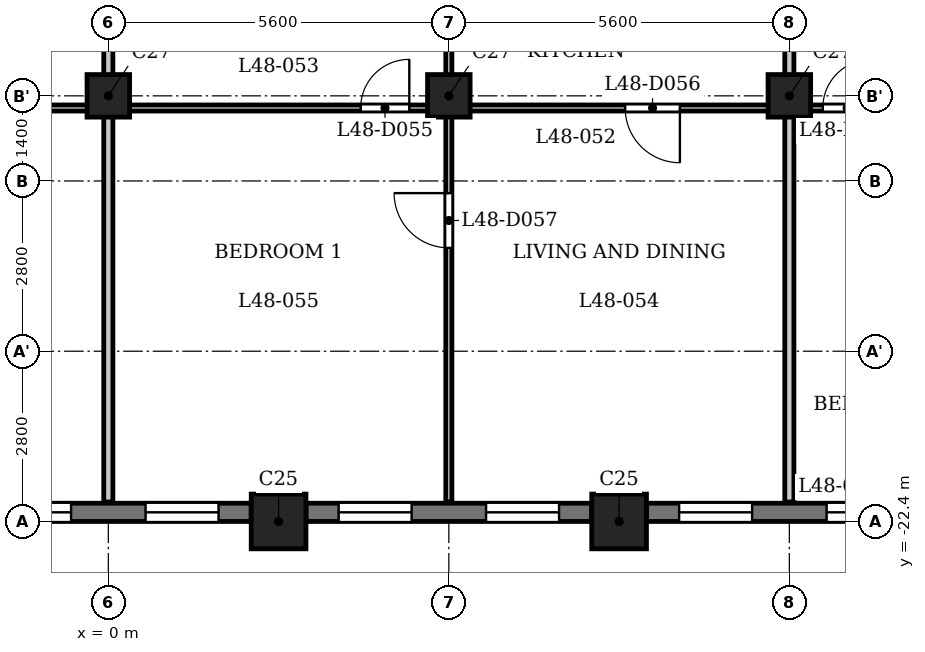
"""IFC4 building model, lengths in metres.
Left out: names, types, materials, properties, quantities, classifications, styles, units other than length and angle.
Written with IfcOpenShell. Run it as: python <this file> out.ifc"""

import sys

from ifc_helpers import new_model, si_unit, direction, frame, frame_2d, origin, origin_2d, place, context, subcontext, project, spatial, rectangle, extrude, element, fill, save


model = new_model("IFC4")
c1 = context("Model", 3, precision=1e-05, world=origin(), true_north=direction((0.0, 1.0)))
c2 = subcontext(c1, "Body", "Model", "MODEL_VIEW")
j1 = project(units=[si_unit("LENGTHUNIT", "METRE"), si_unit("PLANEANGLEUNIT", "RADIAN")], contexts=[c1])
p1 = place(None, origin())
s1 = spatial("IfcSite", under=j1, at=p1, CompositionType="ELEMENT")
p2 = place(p1, origin())
s2 = spatial("IfcBuilding", under=s1, at=p2, CompositionType="ELEMENT")
p3 = place(p2, frame((0.0, 0.0, 188.9)))
s3 = spatial("IfcBuildingStorey", under=s2, at=p3, CompositionType="ELEMENT", Elevation=188.9)
for number, where, z_axis, x_axis in (
    (1, (2.8, -22.4, 0.0), (0.0, 0.0, 1.0), (1.0, 0.0, 0.0)),
    (2, (8.4, -22.4, 0.0), (0.0, 0.0, 1.0), (1.0, 0.0, 0.0)),
):
    element("IfcColumn", number, at=place(p3, frame(where, z_axis=z_axis, x_axis=x_axis)), inside=s3, PredefinedType="COLUMN", context=c2, shape_type="SweptSolid", body=[
        extrude(rectangle(XDim=0.9, YDim=0.9, at=origin_2d()), origin(), (0.0, 0.0, 1.0), 3.5),
    ])
for number, where, z_axis, x_axis in (
    (3, (0.0, -15.4, 0.0), (0.0, 0.0, 1.0), (1.0, 0.0, 0.0)),
    (4, (5.6, -15.4, 0.0), (0.0, 0.0, 1.0), (1.0, 0.0, 0.0)),
    (5, (11.2, -15.4, 0.0), (0.0, 0.0, 1.0), (1.0, 0.0, 0.0)),
):
    element("IfcColumn", number, at=place(p3, frame(where, z_axis=z_axis, x_axis=x_axis)), inside=s3, PredefinedType="COLUMN", context=c2, shape_type="SweptSolid", body=[
        extrude(rectangle(XDim=0.7, YDim=0.7, at=origin_2d()), origin(), (0.0, 0.0, 1.0), 3.5),
    ])
p4 = place(p3, frame((-2.35, -22.25, 0.0), z_axis=(0.0, 0.0, 1.0), x_axis=(1.0, 0.0, 0.0)))
e6 = element("IfcWall", 6, at=p4, inside=s3, PredefinedType="SOLIDWALL", context=c2, shape_type="SweptSolid", body=[
    extrude(rectangle(XDim=4.7, YDim=0.3, at=frame_2d((2.35, 0.0))), origin(), (0.0, 0.0, 1.0), 2.5),
])
p5 = place(p4, frame((0.538, 0.0, 0.6)))
e7 = element("IfcOpeningElement", 7, at=p5, cuts=e6, PredefinedType="OPENING", context=c2, shape_type="SweptSolid", body=[
    extrude(rectangle(XDim=1.2, YDim=1.55, at=frame_2d((0.6, 0.775))), frame((0.0, 0.16, 0.0), z_axis=(0.0, -1.0, 0.0), x_axis=(1.0, 0.0, 0.0)), (0.0, 0.0, 1.0), 0.32),
])
p6 = place(p4, frame((2.962, 0.0, 0.6)))
e8 = element("IfcOpeningElement", 8, at=p6, cuts=e6, PredefinedType="OPENING", context=c2, shape_type="SweptSolid", body=[
    extrude(rectangle(XDim=1.2, YDim=1.55, at=frame_2d((0.6, 0.775))), frame((0.0, 0.16, 0.0), z_axis=(0.0, -1.0, 0.0), x_axis=(1.0, 0.0, 0.0)), (0.0, 0.0, 1.0), 0.32),
])
p7 = place(p3, frame((3.25, -22.25, 0.0), z_axis=(0.0, 0.0, 1.0), x_axis=(1.0, 0.0, 0.0)))
e9 = element("IfcWall", 9, at=p7, inside=s3, PredefinedType="SOLIDWALL", context=c2, shape_type="SweptSolid", body=[
    extrude(rectangle(XDim=4.7, YDim=0.3, at=frame_2d((2.35, 0.0))), origin(), (0.0, 0.0, 1.0), 2.5),
])
p8 = place(p7, frame((0.538, 0.0, 0.6)))
e10 = element("IfcOpeningElement", 10, at=p8, cuts=e9, PredefinedType="OPENING", context=c2, shape_type="SweptSolid", body=[
    extrude(rectangle(XDim=1.2, YDim=1.55, at=frame_2d((0.6, 0.775))), frame((0.0, 0.16, 0.0), z_axis=(0.0, -1.0, 0.0), x_axis=(1.0, 0.0, 0.0)), (0.0, 0.0, 1.0), 0.32),
])
p9 = place(p7, frame((2.962, 0.0, 0.6)))
e11 = element("IfcOpeningElement", 11, at=p9, cuts=e9, PredefinedType="OPENING", context=c2, shape_type="SweptSolid", body=[
    extrude(rectangle(XDim=1.2, YDim=1.55, at=frame_2d((0.6, 0.775))), frame((0.0, 0.16, 0.0), z_axis=(0.0, -1.0, 0.0), x_axis=(1.0, 0.0, 0.0)), (0.0, 0.0, 1.0), 0.32),
])
p10 = place(p3, frame((8.85, -22.25, 0.0), z_axis=(0.0, 0.0, 1.0), x_axis=(1.0, 0.0, 0.0)))
e12 = element("IfcWall", 12, at=p10, inside=s3, PredefinedType="SOLIDWALL", context=c2, shape_type="SweptSolid", body=[
    extrude(rectangle(XDim=4.7, YDim=0.3, at=frame_2d((2.35, 0.0))), origin(), (0.0, 0.0, 1.0), 2.5),
])
p11 = place(p10, frame((0.538, 0.0, 0.6)))
e13 = element("IfcOpeningElement", 13, at=p11, cuts=e12, PredefinedType="OPENING", context=c2, shape_type="SweptSolid", body=[
    extrude(rectangle(XDim=1.2, YDim=1.55, at=frame_2d((0.6, 0.775))), frame((0.0, 0.16, 0.0), z_axis=(0.0, -1.0, 0.0), x_axis=(1.0, 0.0, 0.0)), (0.0, 0.0, 1.0), 0.32),
])
p12 = place(p10, frame((2.962, 0.0, 0.6)))
e14 = element("IfcOpeningElement", 14, at=p12, cuts=e12, PredefinedType="OPENING", context=c2, shape_type="SweptSolid", body=[
    extrude(rectangle(XDim=1.2, YDim=1.55, at=frame_2d((0.6, 0.775))), frame((0.0, 0.16, 0.0), z_axis=(0.0, -1.0, 0.0), x_axis=(1.0, 0.0, 0.0)), (0.0, 0.0, 1.0), 0.32),
])
p13 = place(p3, frame((-16.725, -15.6, 0.0), z_axis=(0.0, 0.0, 1.0), x_axis=(1.0, 0.0, 0.0)))
e15 = element("IfcWall", 15, at=p13, inside=s3, PredefinedType="PARTITIONING", context=c2, shape_type="SweptSolid", body=[
    extrude(rectangle(XDim=33.45, YDim=0.1, at=frame_2d((16.725, 0.0))), origin(), (0.0, 0.0, 1.0), 3.2),
])
p14 = place(p13, frame((4.075, 0.0, 0.0)))
e16 = element("IfcOpeningElement", 16, at=p14, cuts=e15, PredefinedType="OPENING", context=c2, shape_type="SweptSolid", body=[
    extrude(rectangle(XDim=0.8, YDim=2.1, at=frame_2d((0.4, 1.05))), frame((0.0, 0.06, 0.0), z_axis=(0.0, -1.0, 0.0), x_axis=(1.0, 0.0, 0.0)), (0.0, 0.0, 1.0), 0.12),
])
p15 = place(p13, frame((1.825, 0.0, 0.0)))
e17 = element("IfcOpeningElement", 17, at=p15, cuts=e15, PredefinedType="OPENING", context=c2, shape_type="SweptSolid", body=[
    extrude(rectangle(XDim=0.9, YDim=2.1, at=frame_2d((0.45, 1.05))), frame((0.0, 0.06, 0.0), z_axis=(0.0, -1.0, 0.0), x_axis=(1.0, 0.0, 0.0)), (0.0, 0.0, 1.0), 0.12),
])
p16 = place(p13, frame((9.675, 0.0, 0.0)))
e18 = element("IfcOpeningElement", 18, at=p16, cuts=e15, PredefinedType="OPENING", context=c2, shape_type="SweptSolid", body=[
    extrude(rectangle(XDim=0.8, YDim=2.1, at=frame_2d((0.4, 1.05))), frame((0.0, 0.06, 0.0), z_axis=(0.0, -1.0, 0.0), x_axis=(1.0, 0.0, 0.0)), (0.0, 0.0, 1.0), 0.12),
])
p17 = place(p13, frame((14.025, 0.0, 0.0)))
e19 = element("IfcOpeningElement", 19, at=p17, cuts=e15, PredefinedType="OPENING", context=c2, shape_type="SweptSolid", body=[
    extrude(rectangle(XDim=0.9, YDim=2.1, at=frame_2d((0.45, 1.05))), frame((0.0, 0.06, 0.0), z_axis=(0.0, -1.0, 0.0), x_axis=(1.0, 0.0, 0.0)), (0.0, 0.0, 1.0), 0.12),
])
p18 = place(p13, frame((20.875, 0.0, 0.0)))
e20 = element("IfcOpeningElement", 20, at=p18, cuts=e15, PredefinedType="OPENING", context=c2, shape_type="SweptSolid", body=[
    extrude(rectangle(XDim=0.8, YDim=2.1, at=frame_2d((0.4, 1.05))), frame((0.0, 0.06, 0.0), z_axis=(0.0, -1.0, 0.0), x_axis=(1.0, 0.0, 0.0)), (0.0, 0.0, 1.0), 0.12),
])
p19 = place(p13, frame((25.225, 0.0, 0.0)))
e21 = element("IfcOpeningElement", 21, at=p19, cuts=e15, PredefinedType="OPENING", context=c2, shape_type="SweptSolid", body=[
    extrude(rectangle(XDim=0.9, YDim=2.1, at=frame_2d((0.45, 1.05))), frame((0.0, 0.06, 0.0), z_axis=(0.0, -1.0, 0.0), x_axis=(1.0, 0.0, 0.0)), (0.0, 0.0, 1.0), 0.12),
])
p20 = place(p13, frame((28.475, 0.0, 0.0)))
e22 = element("IfcOpeningElement", 22, at=p20, cuts=e15, PredefinedType="OPENING", context=c2, shape_type="SweptSolid", body=[
    extrude(rectangle(XDim=0.8, YDim=2.1, at=frame_2d((0.4, 1.05))), frame((0.0, 0.06, 0.0), z_axis=(0.0, -1.0, 0.0), x_axis=(1.0, 0.0, 0.0)), (0.0, 0.0, 1.0), 0.12),
])
p21 = place(p13, frame((30.675, 0.0, 0.0)))
e23 = element("IfcOpeningElement", 23, at=p21, cuts=e15, PredefinedType="OPENING", context=c2, shape_type="SweptSolid", body=[
    extrude(rectangle(XDim=0.9, YDim=2.1, at=frame_2d((0.45, 1.05))), frame((0.0, 0.06, 0.0), z_axis=(0.0, -1.0, 0.0), x_axis=(1.0, 0.0, 0.0)), (0.0, 0.0, 1.0), 0.12),
])
p22 = place(p3, frame((0.0, -22.08, 0.0), z_axis=(0.0, 0.0, 1.0), x_axis=(0.0, 1.0, 0.0)))
e24 = element("IfcWall", 24, at=p22, inside=s3, PredefinedType="PARTITIONING", context=c2, shape_type="SweptSolid", body=[
    extrude(rectangle(XDim=6.43, YDim=0.15, at=frame_2d((3.215, 0.0))), origin(), (0.0, 0.0, 1.0), 3.2),
])
p23 = place(p3, frame((0.0, -15.55, 0.0), z_axis=(0.0, 0.0, 1.0), x_axis=(0.0, 1.0, 0.0)))
e25 = element("IfcWall", 25, at=p23, inside=s3, PredefinedType="PARTITIONING", context=c2, shape_type="SweptSolid", body=[
    extrude(rectangle(XDim=2.275, YDim=0.15, at=frame_2d((1.138, 0.0))), origin(), (0.0, 0.0, 1.0), 3.2),
])
p24 = place(p3, frame((5.6, -22.08, 0.0), z_axis=(0.0, 0.0, 1.0), x_axis=(0.0, 1.0, 0.0)))
e26 = element("IfcWall", 26, at=p24, inside=s3, PredefinedType="PARTITIONING", context=c2, shape_type="SweptSolid", body=[
    extrude(rectangle(XDim=6.43, YDim=0.1, at=frame_2d((3.215, 0.0))), origin(), (0.0, 0.0, 1.0), 3.2),
])
p25 = place(p24, frame((4.18, 0.0, 0.0)))
e27 = element("IfcOpeningElement", 27, at=p25, cuts=e26, PredefinedType="OPENING", context=c2, shape_type="SweptSolid", body=[
    extrude(rectangle(XDim=0.9, YDim=2.1, at=frame_2d((0.45, 1.05))), frame((0.0, 0.06, 0.0), z_axis=(0.0, -1.0, 0.0), x_axis=(1.0, 0.0, 0.0)), (0.0, 0.0, 1.0), 0.12),
])
p26 = place(p3, frame((5.6, -15.55, 0.0), z_axis=(0.0, 0.0, 1.0), x_axis=(0.0, 1.0, 0.0)))
e28 = element("IfcWall", 28, at=p26, inside=s3, PredefinedType="PARTITIONING", context=c2, shape_type="SweptSolid", body=[
    extrude(rectangle(XDim=2.275, YDim=0.1, at=frame_2d((1.138, 0.0))), origin(), (0.0, 0.0, 1.0), 3.2),
])
p27 = place(p3, frame((11.2, -22.08, 0.0), z_axis=(0.0, 0.0, 1.0), x_axis=(0.0, 1.0, 0.0)))
e29 = element("IfcWall", 29, at=p27, inside=s3, PredefinedType="PARTITIONING", context=c2, shape_type="SweptSolid", body=[
    extrude(rectangle(XDim=6.43, YDim=0.15, at=frame_2d((3.215, 0.0))), origin(), (0.0, 0.0, 1.0), 3.2),
])
p28 = place(p3, frame((11.2, -15.55, 0.0), z_axis=(0.0, 0.0, 1.0), x_axis=(0.0, 1.0, 0.0)))
e30 = element("IfcWall", 30, at=p28, inside=s3, PredefinedType="PARTITIONING", context=c2, shape_type="SweptSolid", body=[
    extrude(rectangle(XDim=2.275, YDim=0.15, at=frame_2d((1.138, 0.0))), origin(), (0.0, 0.0, 1.0), 3.2),
])
p29 = place(p18, origin())
e31 = element("IfcDoor", 31, at=p29, inside=s3, OperationType="SINGLE_SWING_LEFT", PredefinedType="DOOR", context=c2, shape_type="SweptSolid", body=[
    extrude(rectangle(XDim=0.8, YDim=2.1, at=frame_2d((0.4, 1.05))), frame((0.0, 0.025, 0.0), z_axis=(0.0, -1.0, 0.0), x_axis=(1.0, 0.0, 0.0)), (0.0, 0.0, 1.0), 0.05),
])
fill(e20, e31)
p30 = place(p19, origin())
e32 = element("IfcDoor", 32, at=p30, inside=s3, OperationType="SINGLE_SWING_RIGHT", PredefinedType="DOOR", context=c2, shape_type="SweptSolid", body=[
    extrude(rectangle(XDim=0.9, YDim=2.1, at=frame_2d((0.45, 1.05))), frame((0.0, 0.025, 0.0), z_axis=(0.0, -1.0, 0.0), x_axis=(1.0, 0.0, 0.0)), (0.0, 0.0, 1.0), 0.05),
])
fill(e21, e32)
p31 = place(p25, origin())
e33 = element("IfcDoor", 33, at=p31, inside=s3, OperationType="SINGLE_SWING_LEFT", PredefinedType="DOOR", context=c2, shape_type="SweptSolid", body=[
    extrude(rectangle(XDim=0.9, YDim=2.1, at=frame_2d((0.45, 1.05))), frame((0.0, 0.025, 0.0), z_axis=(0.0, -1.0, 0.0), x_axis=(1.0, 0.0, 0.0)), (0.0, 0.0, 1.0), 0.05),
])
fill(e27, e33)
p32 = place(p20, origin())
e34 = element("IfcDoor", 34, at=p32, inside=s3, OperationType="SINGLE_SWING_LEFT", PredefinedType="DOOR", context=c2, shape_type="SweptSolid", body=[
    extrude(rectangle(XDim=0.8, YDim=2.1, at=frame_2d((0.4, 1.05))), frame((0.0, 0.025, 0.0), z_axis=(0.0, -1.0, 0.0), x_axis=(1.0, 0.0, 0.0)), (0.0, 0.0, 1.0), 0.05),
])
fill(e22, e34)
p33 = place(p5, origin())
e35 = element("IfcWindow", 35, at=p33, inside=s3, PartitioningType="SINGLE_PANEL", PredefinedType="WINDOW", context=c2, shape_type="SweptSolid", body=[
    extrude(rectangle(XDim=1.2, YDim=1.55, at=frame_2d((0.6, 0.775))), frame((0.0, 0.03, 0.0), z_axis=(0.0, -1.0, 0.0), x_axis=(1.0, 0.0, 0.0)), (0.0, 0.0, 1.0), 0.06),
])
fill(e7, e35)
p34 = place(p6, origin())
e36 = element("IfcWindow", 36, at=p34, inside=s3, PartitioningType="SINGLE_PANEL", PredefinedType="WINDOW", context=c2, shape_type="SweptSolid", body=[
    extrude(rectangle(XDim=1.2, YDim=1.55, at=frame_2d((0.6, 0.775))), frame((0.0, 0.03, 0.0), z_axis=(0.0, -1.0, 0.0), x_axis=(1.0, 0.0, 0.0)), (0.0, 0.0, 1.0), 0.06),
])
fill(e8, e36)
p35 = place(p8, origin())
e37 = element("IfcWindow", 37, at=p35, inside=s3, PartitioningType="SINGLE_PANEL", PredefinedType="WINDOW", context=c2, shape_type="SweptSolid", body=[
    extrude(rectangle(XDim=1.2, YDim=1.55, at=frame_2d((0.6, 0.775))), frame((0.0, 0.03, 0.0), z_axis=(0.0, -1.0, 0.0), x_axis=(1.0, 0.0, 0.0)), (0.0, 0.0, 1.0), 0.06),
])
fill(e10, e37)
p36 = place(p9, origin())
e38 = element("IfcWindow", 38, at=p36, inside=s3, PartitioningType="SINGLE_PANEL", PredefinedType="WINDOW", context=c2, shape_type="SweptSolid", body=[
    extrude(rectangle(XDim=1.2, YDim=1.55, at=frame_2d((0.6, 0.775))), frame((0.0, 0.03, 0.0), z_axis=(0.0, -1.0, 0.0), x_axis=(1.0, 0.0, 0.0)), (0.0, 0.0, 1.0), 0.06),
])
fill(e11, e38)
p37 = place(p11, origin())
e39 = element("IfcWindow", 39, at=p37, inside=s3, PartitioningType="SINGLE_PANEL", PredefinedType="WINDOW", context=c2, shape_type="SweptSolid", body=[
    extrude(rectangle(XDim=1.2, YDim=1.55, at=frame_2d((0.6, 0.775))), frame((0.0, 0.03, 0.0), z_axis=(0.0, -1.0, 0.0), x_axis=(1.0, 0.0, 0.0)), (0.0, 0.0, 1.0), 0.06),
])
fill(e13, e39)
p38 = place(p12, origin())
e40 = element("IfcWindow", 40, at=p38, inside=s3, PartitioningType="SINGLE_PANEL", PredefinedType="WINDOW", context=c2, shape_type="SweptSolid", body=[
    extrude(rectangle(XDim=1.2, YDim=1.55, at=frame_2d((0.6, 0.775))), frame((0.0, 0.03, 0.0), z_axis=(0.0, -1.0, 0.0), x_axis=(1.0, 0.0, 0.0)), (0.0, 0.0, 1.0), 0.06),
])
fill(e14, e40)
save(model, sys.argv[1])
